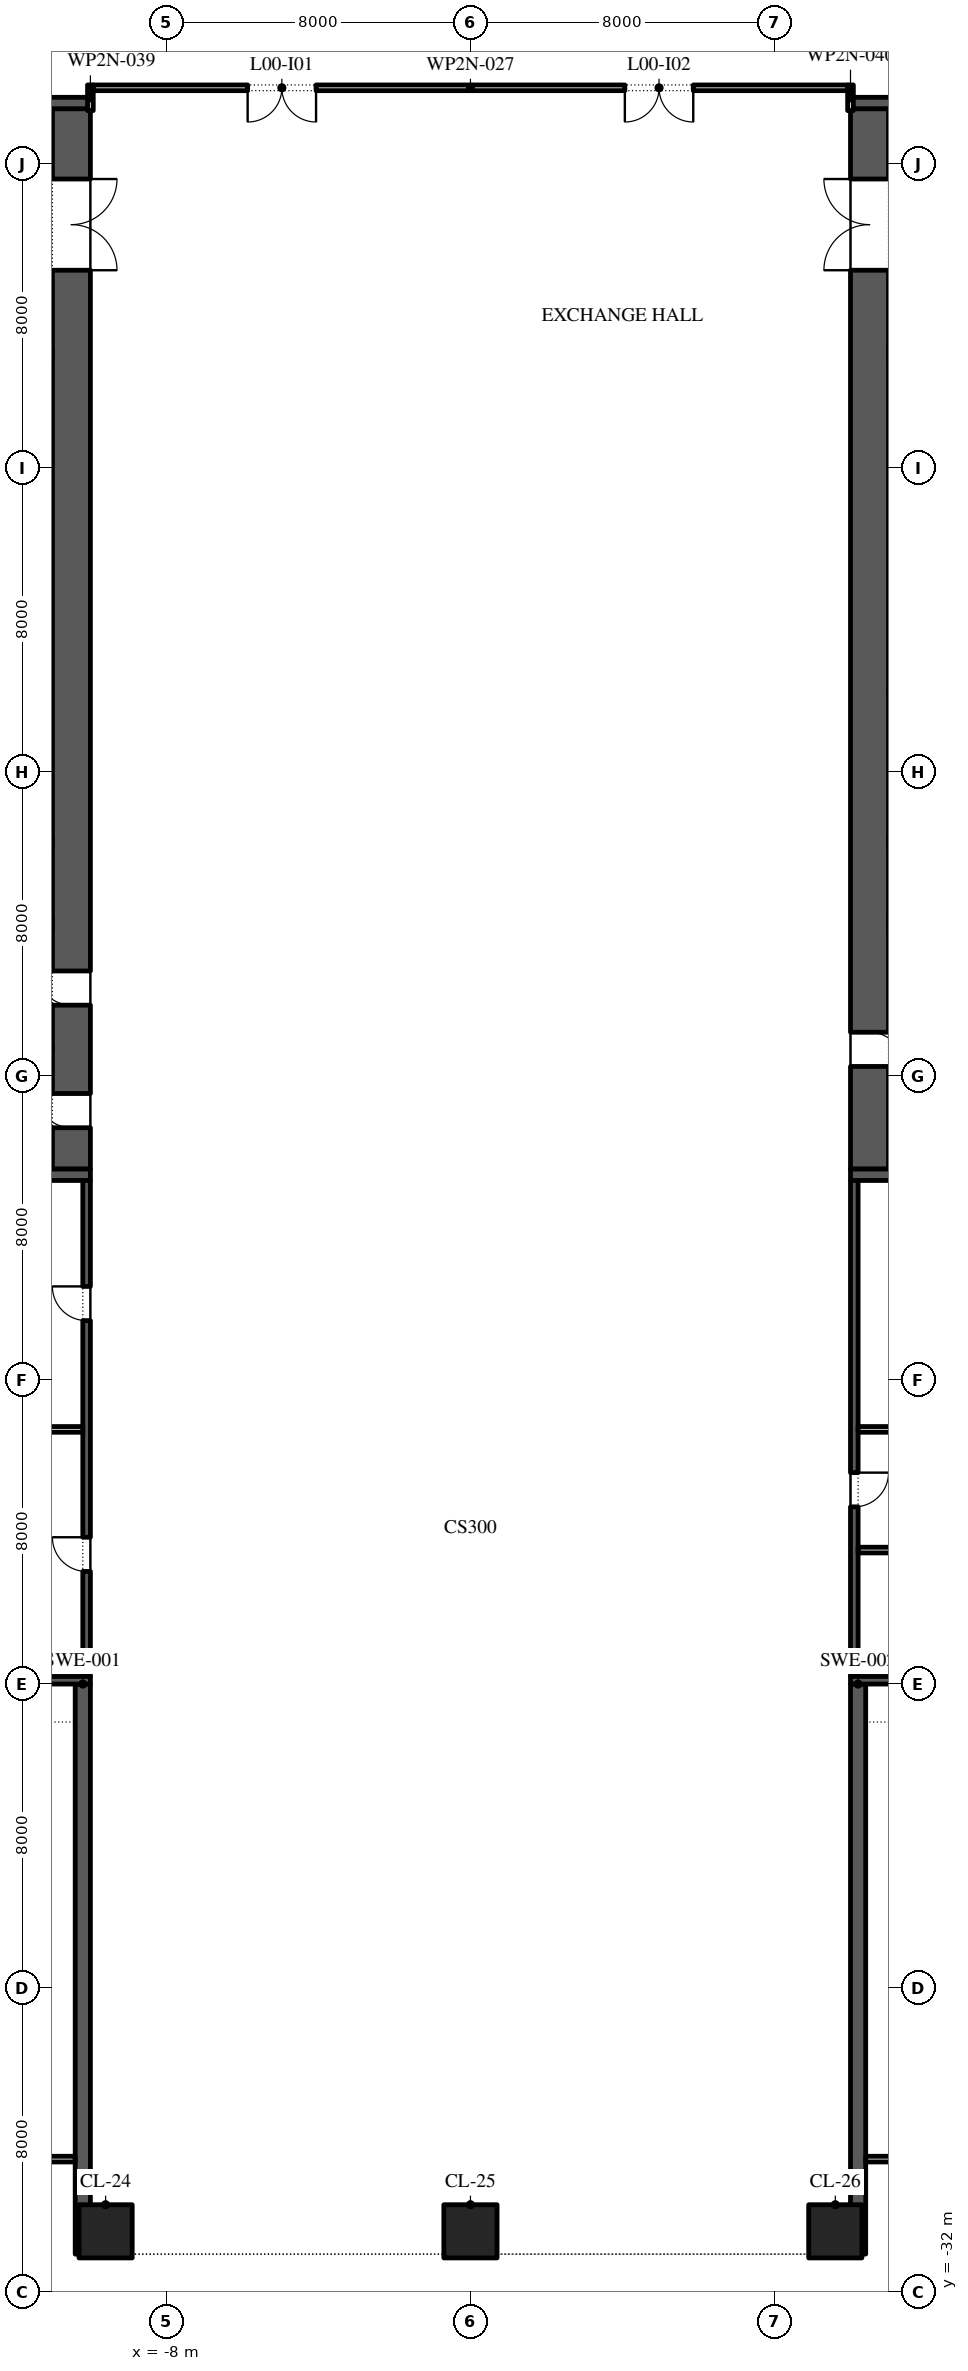
"""IFC4 building model, lengths in metres.
Left out: names, types, materials, properties, quantities, classifications, styles, units other than length and angle.
Written with IfcOpenShell. Run it as: python <this file> out.ifc"""

import sys

from ifc_helpers import new_model, si_unit, direction, frame, frame_2d, origin, origin_2d, place, context, subcontext, project, spatial, rectangle, extrude, element, fill, save


model = new_model("IFC4")
c1 = context("Model", 3, precision=1e-05, world=origin(), true_north=direction((0.0, 1.0)))
c2 = subcontext(c1, "Body", "Model", "MODEL_VIEW")
j1 = project(units=[si_unit("LENGTHUNIT", "METRE"), si_unit("PLANEANGLEUNIT", "RADIAN")], contexts=[c1])
p1 = place(None, origin())
s1 = spatial("IfcSite", under=j1, at=p1, CompositionType="ELEMENT")
p2 = place(p1, origin())
s2 = spatial("IfcBuilding", under=s1, at=p2, CompositionType="ELEMENT")
p3 = place(p2, origin())
s3 = spatial("IfcBuildingStorey", under=s2, at=p3, CompositionType="ELEMENT", Elevation=0.0)
for number, where, z_axis, x_axis in (
    (1, (-9.6, -30.4, 0.0), (0.0, 0.0, 1.0), (1.0, 0.0, 0.0)),
    (2, (0.0, -30.4, 0.0), (0.0, 0.0, 1.0), (1.0, 0.0, 0.0)),
    (3, (9.6, -30.4, 0.0), (0.0, 0.0, 1.0), (1.0, 0.0, 0.0)),
):
    element("IfcColumn", number, at=place(p3, frame(where, z_axis=z_axis, x_axis=x_axis)), inside=s3, PredefinedType="COLUMN", context=c2, shape_type="SweptSolid", body=[
        extrude(rectangle(XDim=1.4, YDim=1.4, at=origin_2d()), origin(), (0.0, 0.0, 1.0), 8.0),
    ])
for number, where, z_axis, x_axis in (
    (4, (-10.2, -31.0, 0.0), (0.0, 0.0, 1.0), (0.0, 1.0, 0.0)),
    (5, (10.2, -31.0, 0.0), (0.0, 0.0, 1.0), (0.0, 1.0, 0.0)),
):
    element("IfcWall", number, at=place(p3, frame(where, z_axis=z_axis, x_axis=x_axis)), inside=s3, PredefinedType="SHEAR", context=c2, shape_type="SweptSolid", body=[
        extrude(rectangle(XDim=15.0, YDim=0.4, at=frame_2d((7.5, 0.0))), origin(), (0.0, 0.0, 1.0), 7.7),
    ])
p4 = place(p3, frame((-10.5, -2.45, 0.0), z_axis=(0.0, 0.0, 1.0), x_axis=(0.0, 1.0, 0.0)))
e6 = element("IfcWall", 6, at=p4, inside=s3, PredefinedType="SHEAR", context=c2, shape_type="SweptSolid", body=[
    extrude(rectangle(XDim=27.9, YDim=1.0, at=frame_2d((13.95, 0.0))), origin(), (0.0, 0.0, 1.0), 7.7),
])
p5 = place(p4, frame((23.65, 0.0, 0.0)))
e7 = element("IfcOpeningElement", 7, at=p5, cuts=e6, PredefinedType="OPENING", context=c2, shape_type="SweptSolid", body=[
    extrude(rectangle(XDim=2.4, YDim=2.1, at=frame_2d((1.2, 1.05))), frame((0.0, 0.51, 0.0), z_axis=(0.0, -1.0, 0.0), x_axis=(1.0, 0.0, 0.0)), (0.0, 0.0, 1.0), 1.02),
])
p6 = place(p4, frame((1.087, 0.0, 0.0)))
e8 = element("IfcOpeningElement", 8, at=p6, cuts=e6, PredefinedType="OPENING", context=c2, shape_type="SweptSolid", body=[
    extrude(rectangle(XDim=0.9, YDim=2.1, at=frame_2d((0.45, 1.05))), frame((0.0, 0.51, 0.0), z_axis=(0.0, -1.0, 0.0), x_axis=(1.0, 0.0, 0.0)), (0.0, 0.0, 1.0), 1.02),
])
p7 = place(p4, frame((4.312, 0.0, 0.0)))
e9 = element("IfcOpeningElement", 9, at=p7, cuts=e6, PredefinedType="OPENING", context=c2, shape_type="SweptSolid", body=[
    extrude(rectangle(XDim=0.9, YDim=2.1, at=frame_2d((0.45, 1.05))), frame((0.0, 0.51, 0.0), z_axis=(0.0, -1.0, 0.0), x_axis=(1.0, 0.0, 0.0)), (0.0, 0.0, 1.0), 1.02),
])
for number, where, z_axis, x_axis in (
    (10, (-22.0, -2.6, 0.0), (0.0, 0.0, 1.0), (1.0, 0.0, 0.0)),
    (11, (-22.0, 25.6, 0.0), (0.0, 0.0, 1.0), (1.0, 0.0, 0.0)),
):
    element("IfcWall", number, at=place(p3, frame(where, z_axis=z_axis, x_axis=x_axis)), inside=s3, PredefinedType="SHEAR", context=c2, shape_type="SweptSolid", body=[
        extrude(rectangle(XDim=12.0, YDim=0.3, at=frame_2d((6.0, 0.0))), origin(), (0.0, 0.0, 1.0), 7.7),
    ])
p8 = place(p3, frame((-10.1, -15.8, 0.0), z_axis=(0.0, 0.0, 1.0), x_axis=(0.0, 1.0, 0.0)))
e12 = element("IfcWall", 12, at=p8, inside=s3, PredefinedType="SHEAR", context=c2, shape_type="SweptSolid", body=[
    extrude(rectangle(XDim=13.05, YDim=0.2, at=frame_2d((6.525, 0.0))), origin(), (0.0, 0.0, 1.0), 7.7),
])
p9 = place(p8, frame((2.762, 0.0, 0.0)))
e13 = element("IfcOpeningElement", 13, at=p9, cuts=e12, PredefinedType="OPENING", context=c2, shape_type="SweptSolid", body=[
    extrude(rectangle(XDim=0.9, YDim=2.1, at=frame_2d((0.45, 1.05))), frame((0.0, 0.11, 0.0), z_axis=(0.0, -1.0, 0.0), x_axis=(1.0, 0.0, 0.0)), (0.0, 0.0, 1.0), 0.22),
])
p10 = place(p8, frame((9.363, 0.0, 0.0)))
e14 = element("IfcOpeningElement", 14, at=p10, cuts=e12, PredefinedType="OPENING", context=c2, shape_type="SweptSolid", body=[
    extrude(rectangle(XDim=0.9, YDim=2.1, at=frame_2d((0.45, 1.05))), frame((0.0, 0.11, 0.0), z_axis=(0.0, -1.0, 0.0), x_axis=(1.0, 0.0, 0.0)), (0.0, 0.0, 1.0), 0.22),
])
p11 = place(p3, frame((-22.0, -15.9, 0.0), z_axis=(0.0, 0.0, 1.0), x_axis=(1.0, 0.0, 0.0)))
e15 = element("IfcWall", 15, at=p11, inside=s3, PredefinedType="SHEAR", context=c2, shape_type="SweptSolid", body=[
    extrude(rectangle(XDim=12.0, YDim=0.2, at=frame_2d((6.0, 0.0))), origin(), (0.0, 0.0, 1.0), 7.7),
])
p12 = place(p3, frame((-16.0, -9.3, 0.0), z_axis=(0.0, 0.0, 1.0), x_axis=(1.0, 0.0, 0.0)))
e16 = element("IfcWall", 16, at=p12, inside=s3, PredefinedType="PARTITIONING", context=c2, shape_type="SweptSolid", body=[
    extrude(rectangle(XDim=5.8, YDim=0.15, at=frame_2d((2.9, 0.0))), origin(), (0.0, 0.0, 1.0), 7.7),
])
p13 = place(p3, frame((10.5, -2.45, 0.0), z_axis=(0.0, 0.0, 1.0), x_axis=(0.0, 1.0, 0.0)))
e17 = element("IfcWall", 17, at=p13, inside=s3, PredefinedType="SHEAR", context=c2, shape_type="SweptSolid", body=[
    extrude(rectangle(XDim=27.9, YDim=1.0, at=frame_2d((13.95, 0.0))), origin(), (0.0, 0.0, 1.0), 7.7),
])
p14 = place(p13, frame((23.65, 0.0, 0.0)))
e18 = element("IfcOpeningElement", 18, at=p14, cuts=e17, PredefinedType="OPENING", context=c2, shape_type="SweptSolid", body=[
    extrude(rectangle(XDim=2.4, YDim=2.1, at=frame_2d((1.2, 1.05))), frame((0.0, 0.51, 0.0), z_axis=(0.0, -1.0, 0.0), x_axis=(1.0, 0.0, 0.0)), (0.0, 0.0, 1.0), 1.02),
])
p15 = place(p13, frame((2.7, 0.0, 0.0)))
e19 = element("IfcOpeningElement", 19, at=p15, cuts=e17, PredefinedType="OPENING", context=c2, shape_type="SweptSolid", body=[
    extrude(rectangle(XDim=0.9, YDim=2.1, at=frame_2d((0.45, 1.05))), frame((0.0, 0.51, 0.0), z_axis=(0.0, -1.0, 0.0), x_axis=(1.0, 0.0, 0.0)), (0.0, 0.0, 1.0), 1.02),
])
for number, where, z_axis, x_axis in (
    (20, (10.0, -2.6, 0.0), (0.0, 0.0, 1.0), (1.0, 0.0, 0.0)),
    (21, (10.0, 25.6, 0.0), (0.0, 0.0, 1.0), (1.0, 0.0, 0.0)),
):
    element("IfcWall", number, at=place(p3, frame(where, z_axis=z_axis, x_axis=x_axis)), inside=s3, PredefinedType="SHEAR", context=c2, shape_type="SweptSolid", body=[
        extrude(rectangle(XDim=12.0, YDim=0.3, at=frame_2d((6.0, 0.0))), origin(), (0.0, 0.0, 1.0), 7.7),
    ])
p16 = place(p3, frame((10.1, -15.8, 0.0), z_axis=(0.0, 0.0, 1.0), x_axis=(0.0, 1.0, 0.0)))
e22 = element("IfcWall", 22, at=p16, inside=s3, PredefinedType="SHEAR", context=c2, shape_type="SweptSolid", body=[
    extrude(rectangle(XDim=13.05, YDim=0.2, at=frame_2d((6.525, 0.0))), origin(), (0.0, 0.0, 1.0), 7.7),
])
p17 = place(p16, frame((4.462, 0.0, 0.0)))
e23 = element("IfcOpeningElement", 23, at=p17, cuts=e22, PredefinedType="OPENING", context=c2, shape_type="SweptSolid", body=[
    extrude(rectangle(XDim=0.9, YDim=2.1, at=frame_2d((0.45, 1.05))), frame((0.0, 0.11, 0.0), z_axis=(0.0, -1.0, 0.0), x_axis=(1.0, 0.0, 0.0)), (0.0, 0.0, 1.0), 0.22),
])
p18 = place(p3, frame((10.0, -15.9, 0.0), z_axis=(0.0, 0.0, 1.0), x_axis=(1.0, 0.0, 0.0)))
e24 = element("IfcWall", 24, at=p18, inside=s3, PredefinedType="SHEAR", context=c2, shape_type="SweptSolid", body=[
    extrude(rectangle(XDim=12.0, YDim=0.2, at=frame_2d((6.0, 0.0))), origin(), (0.0, 0.0, 1.0), 7.7),
])
for number, where, z_axis, x_axis in (
    (25, (10.2, -9.3, 0.0), (0.0, 0.0, 1.0), (1.0, 0.0, 0.0)),
    (26, (10.2, -12.475, 0.0), (0.0, 0.0, 1.0), (1.0, 0.0, 0.0)),
):
    element("IfcWall", number, at=place(p3, frame(where, z_axis=z_axis, x_axis=x_axis)), inside=s3, PredefinedType="PARTITIONING", context=c2, shape_type="SweptSolid", body=[
        extrude(rectangle(XDim=11.6, YDim=0.15, at=frame_2d((5.8, 0.0))), origin(), (0.0, 0.0, 1.0), 7.7),
    ])
p19 = place(p3, frame((-22.0, -28.5, 0.0), z_axis=(0.0, 0.0, 1.0), x_axis=(1.0, 0.0, 0.0)))
e27 = element("IfcWall", 27, at=p19, inside=s3, PredefinedType="PARTITIONING", context=c2, shape_type="SweptSolid", body=[
    extrude(rectangle(XDim=11.6, YDim=0.15, at=frame_2d((5.8, 0.0))), origin(), (0.0, 0.0, 1.0), 7.7),
])
p20 = place(p19, frame((5.3, 0.0, 0.0)))
e28 = element("IfcOpeningElement", 28, at=p20, cuts=e27, PredefinedType="OPENING", context=c2, shape_type="SweptSolid", body=[
    extrude(rectangle(XDim=1.0, YDim=2.1, at=frame_2d((0.5, 1.05))), frame((0.0, 0.085, 0.0), z_axis=(0.0, -1.0, 0.0), x_axis=(1.0, 0.0, 0.0)), (0.0, 0.0, 1.0), 0.17),
])
p21 = place(p3, frame((10.4, -28.5, 0.0), z_axis=(0.0, 0.0, 1.0), x_axis=(1.0, 0.0, 0.0)))
e29 = element("IfcWall", 29, at=p21, inside=s3, PredefinedType="PARTITIONING", context=c2, shape_type="SweptSolid", body=[
    extrude(rectangle(XDim=11.6, YDim=0.15, at=frame_2d((5.8, 0.0))), origin(), (0.0, 0.0, 1.0), 7.7),
])
p22 = place(p21, frame((5.3, 0.0, 0.0)))
e30 = element("IfcOpeningElement", 30, at=p22, cuts=e29, PredefinedType="OPENING", context=c2, shape_type="SweptSolid", body=[
    extrude(rectangle(XDim=1.0, YDim=2.1, at=frame_2d((0.5, 1.05))), frame((0.0, 0.085, 0.0), z_axis=(0.0, -1.0, 0.0), x_axis=(1.0, 0.0, 0.0)), (0.0, 0.0, 1.0), 0.17),
])
p23 = place(p3, frame((-9.925, 26.0, 0.0), z_axis=(0.0, 0.0, 1.0), x_axis=(1.0, 0.0, 0.0)))
e31 = element("IfcWall", 31, at=p23, inside=s3, PredefinedType="PARTITIONING", context=c2, shape_type="SweptSolid", body=[
    extrude(rectangle(XDim=19.85, YDim=0.15, at=frame_2d((9.925, 0.0))), origin(), (0.0, 0.0, 1.0), 7.7),
])
p24 = place(p23, frame((4.062, 0.0, 0.0)))
e32 = element("IfcOpeningElement", 32, at=p24, cuts=e31, PredefinedType="OPENING", context=c2, shape_type="SweptSolid", body=[
    extrude(rectangle(XDim=1.8, YDim=2.1, at=frame_2d((0.9, 1.05))), frame((0.0, 0.085, 0.0), z_axis=(0.0, -1.0, 0.0), x_axis=(1.0, 0.0, 0.0)), (0.0, 0.0, 1.0), 0.17),
])
p25 = place(p23, frame((13.988, 0.0, 0.0)))
e33 = element("IfcOpeningElement", 33, at=p25, cuts=e31, PredefinedType="OPENING", context=c2, shape_type="SweptSolid", body=[
    extrude(rectangle(XDim=1.8, YDim=2.1, at=frame_2d((0.9, 1.05))), frame((0.0, 0.085, 0.0), z_axis=(0.0, -1.0, 0.0), x_axis=(1.0, 0.0, 0.0)), (0.0, 0.0, 1.0), 0.17),
])
for number, where, z_axis, x_axis in (
    (34, (-10.0, 25.4, 0.0), (0.0, 0.0, 1.0), (0.0, 1.0, 0.0)),
    (35, (10.0, 25.4, 0.0), (0.0, 0.0, 1.0), (0.0, 1.0, 0.0)),
):
    element("IfcWall", number, at=place(p3, frame(where, z_axis=z_axis, x_axis=x_axis)), inside=s3, PredefinedType="PARTITIONING", context=c2, shape_type="SweptSolid", body=[
        extrude(rectangle(XDim=0.675, YDim=0.15, at=frame_2d((0.337, 0.0))), origin(), (0.0, 0.0, 1.0), 7.7),
    ])
p26 = place(p5, frame((2.4, 0.0, 0.0), z_axis=(0.0, 0.0, 1.0), x_axis=(-1.0, 0.0, 0.0)))
e36 = element("IfcDoor", 36, at=p26, inside=s3, OperationType="DOUBLE_DOOR_SINGLE_SWING", PredefinedType="DOOR", context=c2, shape_type="SweptSolid", body=[
    extrude(rectangle(XDim=2.4, YDim=2.1, at=frame_2d((1.2, 1.05))), frame((0.0, 0.025, 0.0), z_axis=(0.0, -1.0, 0.0), x_axis=(1.0, 0.0, 0.0)), (0.0, 0.0, 1.0), 0.05),
])
fill(e7, e36)
p27 = place(p6, origin())
e37 = element("IfcDoor", 37, at=p27, inside=s3, OperationType="SINGLE_SWING_LEFT", PredefinedType="DOOR", context=c2, shape_type="SweptSolid", body=[
    extrude(rectangle(XDim=0.9, YDim=2.1, at=frame_2d((0.45, 1.05))), frame((0.0, 0.5, 0.0), z_axis=(0.0, -1.0, 0.0), x_axis=(1.0, 0.0, 0.0)), (0.0, 0.0, 1.0), 0.05),
])
fill(e8, e37)
p28 = place(p7, origin())
e38 = element("IfcDoor", 38, at=p28, inside=s3, OperationType="SINGLE_SWING_LEFT", PredefinedType="DOOR", context=c2, shape_type="SweptSolid", body=[
    extrude(rectangle(XDim=0.9, YDim=2.1, at=frame_2d((0.45, 1.05))), frame((0.0, 0.5, 0.0), z_axis=(0.0, -1.0, 0.0), x_axis=(1.0, 0.0, 0.0)), (0.0, 0.0, 1.0), 0.05),
])
fill(e9, e38)
p29 = place(p9, origin())
e39 = element("IfcDoor", 39, at=p29, inside=s3, OperationType="SINGLE_SWING_LEFT", PredefinedType="DOOR", context=c2, shape_type="SweptSolid", body=[
    extrude(rectangle(XDim=0.9, YDim=2.1, at=frame_2d((0.45, 1.05))), frame((0.0, 0.1, 0.0), z_axis=(0.0, -1.0, 0.0), x_axis=(1.0, 0.0, 0.0)), (0.0, 0.0, 1.0), 0.05),
])
fill(e13, e39)
p30 = place(p10, origin())
e40 = element("IfcDoor", 40, at=p30, inside=s3, OperationType="SINGLE_SWING_LEFT", PredefinedType="DOOR", context=c2, shape_type="SweptSolid", body=[
    extrude(rectangle(XDim=0.9, YDim=2.1, at=frame_2d((0.45, 1.05))), frame((0.0, 0.1, 0.0), z_axis=(0.0, -1.0, 0.0), x_axis=(1.0, 0.0, 0.0)), (0.0, 0.0, 1.0), 0.05),
])
fill(e14, e40)
p31 = place(p14, origin())
e41 = element("IfcDoor", 41, at=p31, inside=s3, OperationType="DOUBLE_DOOR_SINGLE_SWING", PredefinedType="DOOR", context=c2, shape_type="SweptSolid", body=[
    extrude(rectangle(XDim=2.4, YDim=2.1, at=frame_2d((1.2, 1.05))), frame((0.0, 0.025, 0.0), z_axis=(0.0, -1.0, 0.0), x_axis=(1.0, 0.0, 0.0)), (0.0, 0.0, 1.0), 0.05),
])
fill(e18, e41)
p32 = place(p15, frame((0.9, -0.95, 0.0), z_axis=(0.0, 0.0, 1.0), x_axis=(-1.0, 0.0, 0.0)))
e42 = element("IfcDoor", 42, at=p32, inside=s3, OperationType="SINGLE_SWING_LEFT", PredefinedType="DOOR", context=c2, shape_type="SweptSolid", body=[
    extrude(rectangle(XDim=0.9, YDim=2.1, at=frame_2d((0.45, 1.05))), frame((0.0, -0.45, 0.0), z_axis=(0.0, -1.0, 0.0), x_axis=(1.0, 0.0, 0.0)), (0.0, 0.0, 1.0), 0.05),
])
fill(e19, e42)
p33 = place(p17, frame((0.9, -0.15, 0.0), z_axis=(0.0, 0.0, 1.0), x_axis=(-1.0, 0.0, 0.0)))
e43 = element("IfcDoor", 43, at=p33, inside=s3, OperationType="SINGLE_SWING_RIGHT", PredefinedType="DOOR", context=c2, shape_type="SweptSolid", body=[
    extrude(rectangle(XDim=0.9, YDim=2.1, at=frame_2d((0.45, 1.05))), frame((0.0, -0.05, 0.0), z_axis=(0.0, -1.0, 0.0), x_axis=(1.0, 0.0, 0.0)), (0.0, 0.0, 1.0), 0.05),
])
fill(e23, e43)
p34 = place(p24, frame((1.8, 0.0, 0.0), z_axis=(0.0, 0.0, 1.0), x_axis=(-1.0, 0.0, 0.0)))
e44 = element("IfcDoor", 44, at=p34, inside=s3, OperationType="SINGLE_SWING_RIGHT", PredefinedType="DOOR", context=c2, shape_type="SweptSolid", body=[
    extrude(rectangle(XDim=1.8, YDim=2.1, at=frame_2d((0.9, 1.05))), frame((0.0, 0.025, 0.0), z_axis=(0.0, -1.0, 0.0), x_axis=(1.0, 0.0, 0.0)), (0.0, 0.0, 1.0), 0.05),
])
fill(e32, e44)
p35 = place(p25, frame((1.8, 0.0, 0.0), z_axis=(0.0, 0.0, 1.0), x_axis=(-1.0, 0.0, 0.0)))
e45 = element("IfcDoor", 45, at=p35, inside=s3, OperationType="SINGLE_SWING_RIGHT", PredefinedType="DOOR", context=c2, shape_type="SweptSolid", body=[
    extrude(rectangle(XDim=1.8, YDim=2.1, at=frame_2d((0.9, 1.05))), frame((0.0, 0.025, 0.0), z_axis=(0.0, -1.0, 0.0), x_axis=(1.0, 0.0, 0.0)), (0.0, 0.0, 1.0), 0.05),
])
fill(e33, e45)
save(model, sys.argv[1])
